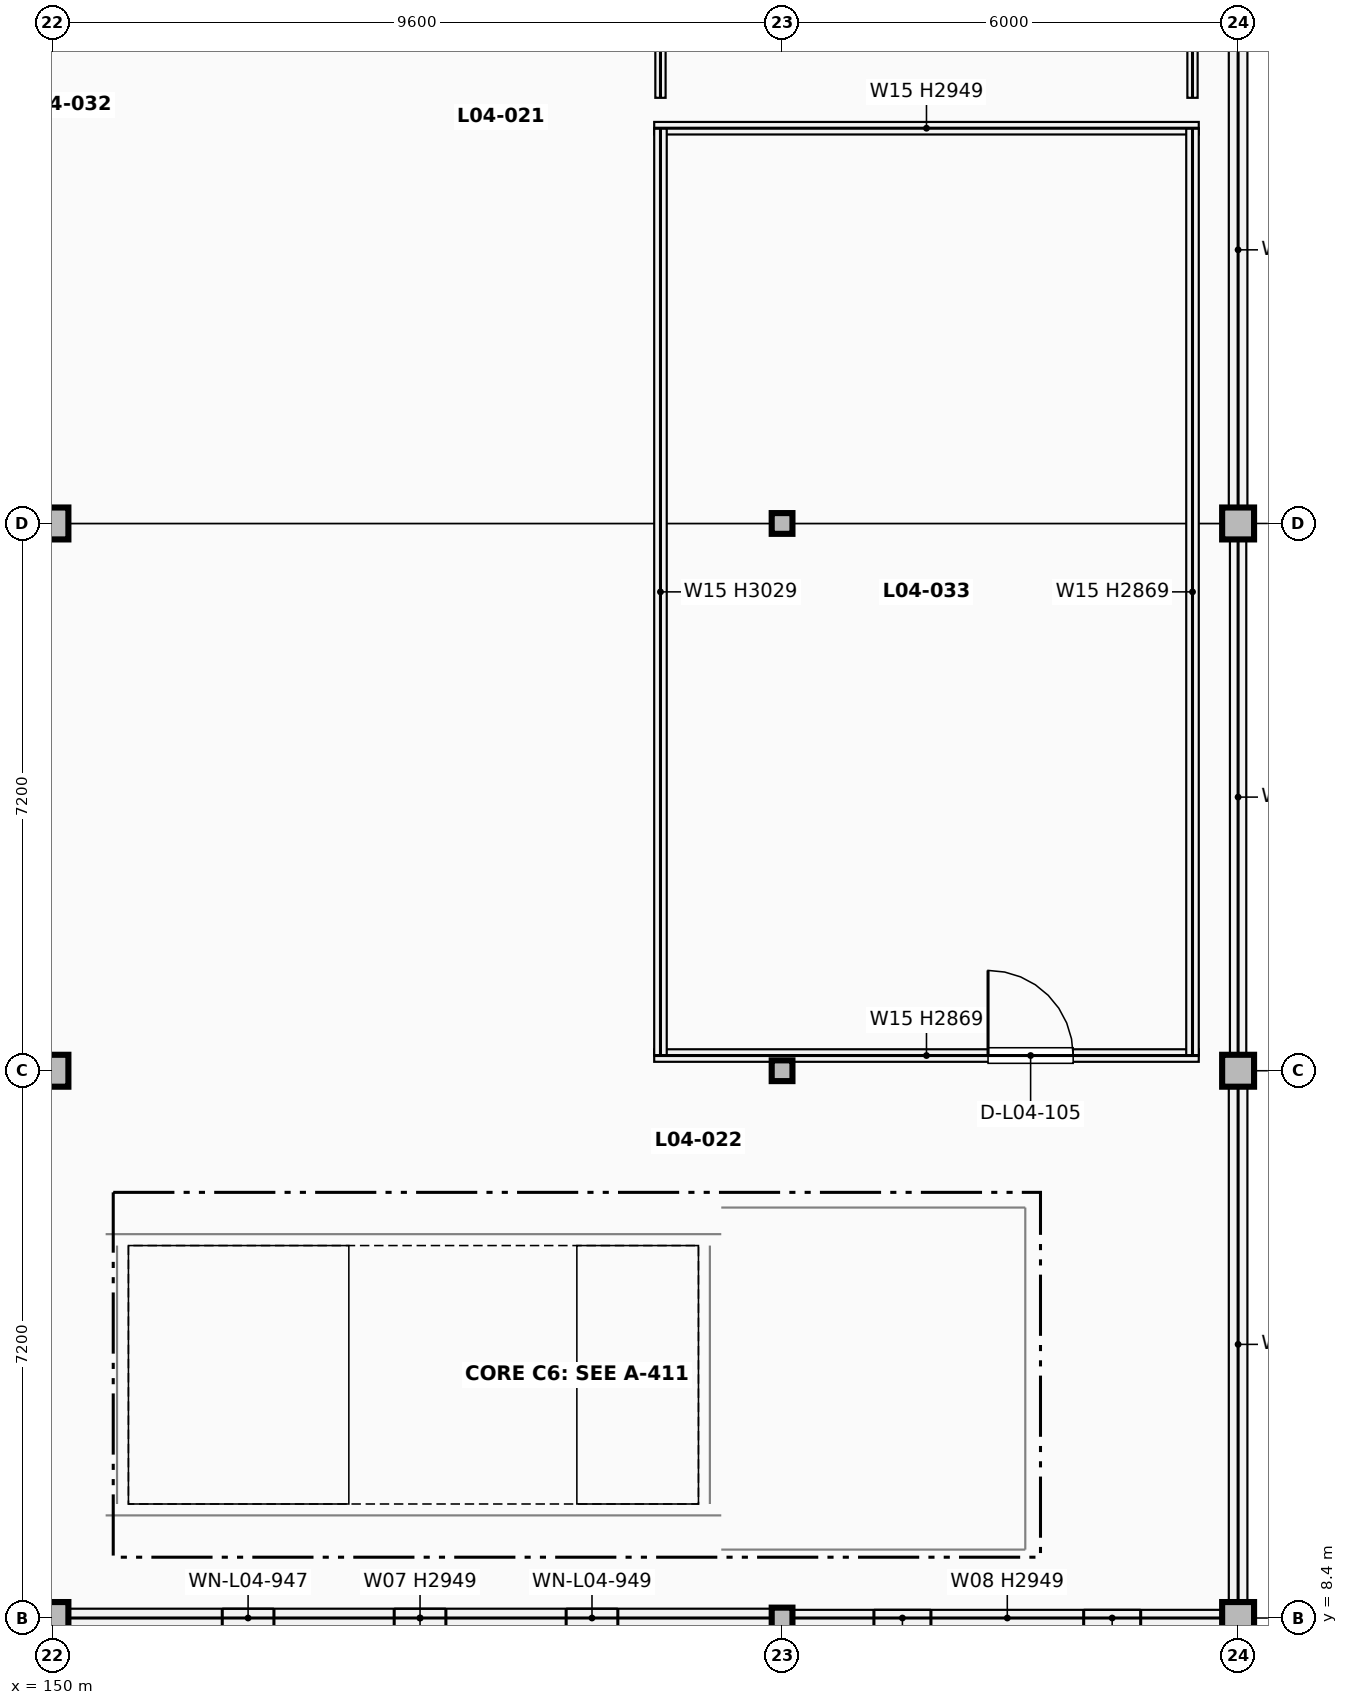
"""IFC4 building model, lengths in metres.
Left out: names, types, materials, properties, quantities, classifications, styles, units other than length and angle.
Written with IfcOpenShell. Run it as: python <this file> out.ifc"""

import sys

from ifc_helpers import new_model, si_unit, direction, frame, frame_2d, origin, origin_2d, place, context, subcontext, project, spatial, rectangle, hollow_circle, extrude, element, fill, save


model = new_model("IFC4")
c1 = context("Model", 3, precision=1e-05, world=origin(), true_north=direction((0.0, 1.0)))
c2 = subcontext(c1, "Body", "Model", "MODEL_VIEW")
j1 = project(units=[si_unit("LENGTHUNIT", "METRE"), si_unit("PLANEANGLEUNIT", "RADIAN")], contexts=[c1])
p1 = place(None, origin())
s1 = spatial("IfcSite", under=j1, at=p1, CompositionType="ELEMENT")
p2 = place(p1, origin())
s2 = spatial("IfcBuilding", under=s1, at=p2, CompositionType="ELEMENT")
p3 = place(p2, frame((0.0, 0.0, 17.34)))
s3 = spatial("IfcBuildingStorey", under=s2, at=p3, CompositionType="ELEMENT", Elevation=17.34)
for number, where, z_axis, x_axis in (
    (1, (150.0, 8.4, 0.0), (0.0, 0.0, 1.0), (1.0, 0.0, 0.0)),
    (2, (150.0, 15.6, 0.0), (0.0, 0.0, 1.0), (1.0, 0.0, 0.0)),
    (3, (150.0, 22.8, 0.0), (0.0, 0.0, 1.0), (1.0, 0.0, 0.0)),
):
    element("IfcColumn", number, at=place(p3, frame(where, z_axis=z_axis, x_axis=x_axis)), inside=s3, PredefinedType="COLUMN", context=c2, shape_type="SweptSolid", body=[
        extrude(rectangle(XDim=0.42, YDim=0.42, at=origin_2d()), origin(), (0.0, 0.0, 1.0), 3.74),
    ])
for number, where, z_axis, x_axis in (
    (4, (159.6, 8.4, 0.0), (0.0, 0.0, 1.0), (1.0, 0.0, 0.0)),
    (5, (159.6, 15.6, 0.0), (0.0, 0.0, 1.0), (1.0, 0.0, 0.0)),
    (6, (159.6, 22.8, 0.0), (0.0, 0.0, 1.0), (1.0, 0.0, 0.0)),
):
    element("IfcColumn", number, at=place(p3, frame(where, z_axis=z_axis, x_axis=x_axis)), inside=s3, PredefinedType="COLUMN", context=c2, shape_type="SweptSolid", body=[
        extrude(hollow_circle(Radius=0.136, WallThickness=0.012, at=origin_2d()), origin(), (0.0, 0.0, 1.0), 3.7),
    ])
for number, where, z_axis, x_axis in (
    (7, (165.6, 8.4, 0.0), (0.0, 0.0, 1.0), (1.0, 0.0, 0.0)),
    (8, (165.6, 15.6, 0.0), (0.0, 0.0, 1.0), (1.0, 0.0, 0.0)),
    (9, (165.6, 22.8, 0.0), (0.0, 0.0, 1.0), (1.0, 0.0, 0.0)),
):
    element("IfcColumn", number, at=place(p3, frame(where, z_axis=z_axis, x_axis=x_axis)), inside=s3, PredefinedType="COLUMN", context=c2, shape_type="SweptSolid", body=[
        extrude(rectangle(XDim=0.42, YDim=0.42, at=origin_2d()), origin(), (0.0, 0.0, 1.0), 3.74),
    ])
p4 = place(p3, frame((165.6, 8.612, 0.0), z_axis=(0.0, 0.0, 1.0), x_axis=(0.0, 1.0, 0.0)))
e10 = element("IfcWall", 10, at=p4, inside=s3, PredefinedType="SOLIDWALL", context=c2, shape_type="SweptSolid", body=[
    extrude(rectangle(XDim=6.776, YDim=0.245, at=frame_2d((3.388, 0.0))), origin(), (0.0, 0.0, 1.0), 2.869),
])
p5 = place(p3, frame((165.6, 15.812, 0.0), z_axis=(0.0, 0.0, 1.0), x_axis=(0.0, 1.0, 0.0)))
e11 = element("IfcWall", 11, at=p5, inside=s3, PredefinedType="SOLIDWALL", context=c2, shape_type="SweptSolid", body=[
    extrude(rectangle(XDim=6.776, YDim=0.215, at=frame_2d((3.388, 0.0))), origin(), (0.0, 0.0, 1.0), 2.869),
])
p6 = place(p3, frame((165.6, 23.012, 0.0), z_axis=(0.0, 0.0, 1.0), x_axis=(0.0, 1.0, 0.0)))
e12 = element("IfcWall", 12, at=p6, inside=s3, PredefinedType="SOLIDWALL", context=c2, shape_type="SweptSolid", body=[
    extrude(rectangle(XDim=6.776, YDim=0.245, at=frame_2d((3.388, 0.0))), origin(), (0.0, 0.0, 1.0), 2.869),
])
p7 = place(p3, frame((150.212, 8.4, 0.0), z_axis=(0.0, 0.0, 1.0), x_axis=(1.0, 0.0, 0.0)))
e13 = element("IfcWall", 13, at=p7, inside=s3, PredefinedType="SOLIDWALL", context=c2, shape_type="SweptSolid", body=[
    extrude(rectangle(XDim=9.25, YDim=0.245, at=frame_2d((4.625, 0.0))), origin(), (0.0, 0.0, 1.0), 2.949),
])
p8 = place(p7, frame((2.022, 0.0, 0.75)))
e14 = element("IfcOpeningElement", 14, at=p8, cuts=e13, PredefinedType="OPENING", context=c2, shape_type="SweptSolid", body=[
    extrude(rectangle(XDim=0.68, YDim=1.96, at=frame_2d((0.34, 0.98))), frame((0.0, 0.133, 0.0), z_axis=(0.0, -1.0, 0.0), x_axis=(1.0, 0.0, 0.0)), (0.0, 0.0, 1.0), 0.265),
])
p9 = place(p7, frame((4.285, 0.0, 0.75)))
e15 = element("IfcOpeningElement", 15, at=p9, cuts=e13, PredefinedType="OPENING", context=c2, shape_type="SweptSolid", body=[
    extrude(rectangle(XDim=0.68, YDim=1.96, at=frame_2d((0.34, 0.98))), frame((0.0, 0.133, 0.0), z_axis=(0.0, -1.0, 0.0), x_axis=(1.0, 0.0, 0.0)), (0.0, 0.0, 1.0), 0.265),
])
p10 = place(p7, frame((6.547, 0.0, 0.75)))
e16 = element("IfcOpeningElement", 16, at=p10, cuts=e13, PredefinedType="OPENING", context=c2, shape_type="SweptSolid", body=[
    extrude(rectangle(XDim=0.68, YDim=1.96, at=frame_2d((0.34, 0.98))), frame((0.0, 0.133, 0.0), z_axis=(0.0, -1.0, 0.0), x_axis=(1.0, 0.0, 0.0)), (0.0, 0.0, 1.0), 0.265),
])
p11 = place(p3, frame((159.739, 8.4, 0.0), z_axis=(0.0, 0.0, 1.0), x_axis=(1.0, 0.0, 0.0)))
e17 = element("IfcWall", 17, at=p11, inside=s3, PredefinedType="SOLIDWALL", context=c2, shape_type="SweptSolid", body=[
    extrude(rectangle(XDim=5.649, YDim=0.215, at=frame_2d((2.825, 0.0))), origin(), (0.0, 0.0, 1.0), 2.949),
])
p12 = place(p11, frame((1.07, 0.0, 0.75)))
e18 = element("IfcOpeningElement", 18, at=p12, cuts=e17, PredefinedType="OPENING", context=c2, shape_type="SweptSolid", body=[
    extrude(rectangle(XDim=0.75, YDim=1.9, at=frame_2d((0.375, 0.95))), frame((0.0, 0.118, 0.0), z_axis=(0.0, -1.0, 0.0), x_axis=(1.0, 0.0, 0.0)), (0.0, 0.0, 1.0), 0.235),
])
p13 = place(p11, frame((3.83, 0.0, 0.75)))
e19 = element("IfcOpeningElement", 19, at=p13, cuts=e17, PredefinedType="OPENING", context=c2, shape_type="SweptSolid", body=[
    extrude(rectangle(XDim=0.75, YDim=1.9, at=frame_2d((0.375, 0.95))), frame((0.0, 0.118, 0.0), z_axis=(0.0, -1.0, 0.0), x_axis=(1.0, 0.0, 0.0)), (0.0, 0.0, 1.0), 0.235),
])
p14 = place(p3, frame((150.85, 9.9, 0.0), z_axis=(0.0, 0.0, 1.0), x_axis=(0.0, 1.0, 0.0)))
e20 = element("IfcWall", 20, at=p14, inside=s3, PredefinedType="SHEAR", context=c2, shape_type="SweptSolid", body=[
    extrude(rectangle(XDim=3.4, YDim=0.3, at=frame_2d((1.7, 0.0))), origin(), (0.0, 0.0, 1.0), 3.74),
])
for number, where, z_axis, x_axis in (
    (21, (150.7, 9.75, 0.0), (0.0, 0.0, 1.0), (1.0, 0.0, 0.0)),
    (22, (150.7, 13.45, 0.0), (0.0, 0.0, 1.0), (1.0, 0.0, 0.0)),
):
    element("IfcWall", number, at=place(p3, frame(where, z_axis=z_axis, x_axis=x_axis)), inside=s3, PredefinedType="SHEAR", context=c2, shape_type="SweptSolid", body=[
        extrude(rectangle(XDim=8.1, YDim=0.3, at=frame_2d((4.05, 0.0))), origin(), (0.0, 0.0, 1.0), 3.74),
    ])
p15 = place(p3, frame((158.65, 9.9, 0.0), z_axis=(0.0, 0.0, 1.0), x_axis=(0.0, 1.0, 0.0)))
e23 = element("IfcWall", 23, at=p15, inside=s3, PredefinedType="SHEAR", context=c2, shape_type="SweptSolid", body=[
    extrude(rectangle(XDim=3.4, YDim=0.3, at=frame_2d((1.7, 0.0))), origin(), (0.0, 0.0, 1.0), 3.74),
])
p16 = place(p15, frame((1.1, 0.0, 0.0)))
e24 = element("IfcOpeningElement", 24, at=p16, cuts=e23, PredefinedType="OPENING", context=c2, shape_type="SweptSolid", body=[
    extrude(rectangle(XDim=1.2, YDim=2.2, at=frame_2d((0.6, 1.1))), frame((0.0, 0.16, 0.0), z_axis=(0.0, -1.0, 0.0), x_axis=(1.0, 0.0, 0.0)), (0.0, 0.0, 1.0), 0.32),
])
p17 = place(p3, frame((162.8, 9.3, 0.0), z_axis=(0.0, 0.0, 1.0), x_axis=(0.0, 1.0, 0.0)))
e25 = element("IfcWall", 25, at=p17, inside=s3, PredefinedType="PARTITIONING", context=c2, shape_type="SweptSolid", body=[
    extrude(rectangle(XDim=4.5, YDim=0.2, at=frame_2d((2.25, 0.0))), origin(), (0.0, 0.0, 1.0), 2.949),
])
p18 = place(p3, frame((158.8, 9.3, 0.0), z_axis=(0.0, 0.0, 1.0), x_axis=(1.0, 0.0, 0.0)))
e26 = element("IfcWall", 26, at=p18, inside=s3, PredefinedType="PARTITIONING", context=c2, shape_type="SweptSolid", body=[
    extrude(rectangle(XDim=4.0, YDim=0.2, at=frame_2d((2.0, 0.0))), origin(), (0.0, 0.0, 1.0), 2.949),
])
p19 = place(p3, frame((158.8, 13.8, 0.0), z_axis=(0.0, 0.0, 1.0), x_axis=(1.0, 0.0, 0.0)))
e27 = element("IfcWall", 27, at=p19, inside=s3, PredefinedType="PARTITIONING", context=c2, shape_type="SweptSolid", body=[
    extrude(rectangle(XDim=4.0, YDim=0.2, at=frame_2d((2.0, 0.0))), origin(), (0.0, 0.0, 1.0), 2.949),
])
p20 = place(p19, frame((1.275, 0.0, 0.0)))
e28 = element("IfcOpeningElement", 28, at=p20, cuts=e27, PredefinedType="OPENING", context=c2, shape_type="SweptSolid", body=[
    extrude(rectangle(XDim=1.45, YDim=2.2, at=frame_2d((0.725, 1.1))), frame((0.0, 0.11, 0.0), z_axis=(0.0, -1.0, 0.0), x_axis=(1.0, 0.0, 0.0)), (0.0, 0.0, 1.0), 0.22),
])
p21 = place(p3, frame((157.917, 15.8, 0.0), z_axis=(0.0, 0.0, 1.0), x_axis=(1.0, 0.0, 0.0)))
e29 = element("IfcWall", 29, at=p21, inside=s3, PredefinedType="PARTITIONING", context=c2, shape_type="SweptSolid", body=[
    extrude(rectangle(XDim=7.165, YDim=0.165, at=frame_2d((3.583, 0.0))), origin(), (0.0, 0.0, 1.0), 2.869),
])
p22 = place(p21, frame((4.393, 0.0, 0.0)))
e30 = element("IfcOpeningElement", 30, at=p22, cuts=e29, PredefinedType="OPENING", context=c2, shape_type="SweptSolid", body=[
    extrude(rectangle(XDim=1.12, YDim=2.22, at=frame_2d((0.56, 1.11))), frame((0.0, 0.093, 0.0), z_axis=(0.0, -1.0, 0.0), x_axis=(1.0, 0.0, 0.0)), (0.0, 0.0, 1.0), 0.185),
])
p23 = place(p3, frame((157.917, 28.0, 0.0), z_axis=(0.0, 0.0, 1.0), x_axis=(1.0, 0.0, 0.0)))
e31 = element("IfcWall", 31, at=p23, inside=s3, PredefinedType="PARTITIONING", context=c2, shape_type="SweptSolid", body=[
    extrude(rectangle(XDim=7.165, YDim=0.165, at=frame_2d((3.583, 0.0))), origin(), (0.0, 0.0, 1.0), 2.949),
])
p24 = place(p3, frame((158.0, 15.8, 0.0), z_axis=(0.0, 0.0, 1.0), x_axis=(0.0, 1.0, 0.0)))
e32 = element("IfcWall", 32, at=p24, inside=s3, PredefinedType="PARTITIONING", context=c2, shape_type="SweptSolid", body=[
    extrude(rectangle(XDim=12.2, YDim=0.165, at=frame_2d((6.1, 0.0))), origin(), (0.0, 0.0, 1.0), 3.029),
])
p25 = place(p3, frame((165.0, 15.8, 0.0), z_axis=(0.0, 0.0, 1.0), x_axis=(0.0, 1.0, 0.0)))
e33 = element("IfcWall", 33, at=p25, inside=s3, PredefinedType="PARTITIONING", context=c2, shape_type="SweptSolid", body=[
    extrude(rectangle(XDim=12.2, YDim=0.165, at=frame_2d((6.1, 0.0))), origin(), (0.0, 0.0, 1.0), 2.869),
])
p26 = place(p3, frame((158.0, 28.4, 0.0), z_axis=(0.0, 0.0, 1.0), x_axis=(0.0, 1.0, 0.0)))
e34 = element("IfcWall", 34, at=p26, inside=s3, PredefinedType="PARTITIONING", context=c2, shape_type="SweptSolid", body=[
    extrude(rectangle(XDim=15.6, YDim=0.135, at=frame_2d((7.8, 0.0))), origin(), (0.0, 0.0, 1.0), 3.029),
])
p27 = place(p26, frame((3.645, 0.0, 0.0)))
e35 = element("IfcOpeningElement", 35, at=p27, cuts=e34, PredefinedType="OPENING", context=c2, shape_type="SweptSolid", body=[
    extrude(rectangle(XDim=1.42, YDim=2.26, at=frame_2d((0.71, 1.13))), frame((0.0, 0.078, 0.0), z_axis=(0.0, -1.0, 0.0), x_axis=(1.0, 0.0, 0.0)), (0.0, 0.0, 1.0), 0.155),
])
p28 = place(p3, frame((165.0, 28.4, 0.0), z_axis=(0.0, 0.0, 1.0), x_axis=(0.0, 1.0, 0.0)))
e36 = element("IfcWall", 36, at=p28, inside=s3, PredefinedType="PARTITIONING", context=c2, shape_type="SweptSolid", body=[
    extrude(rectangle(XDim=15.6, YDim=0.135, at=frame_2d((7.8, 0.0))), origin(), (0.0, 0.0, 1.0), 2.869),
])
p29 = place(p8, origin())
e37 = element("IfcWindow", 37, at=p29, inside=s3, PartitioningType="SINGLE_PANEL", PredefinedType="WINDOW", context=c2, shape_type="SweptSolid", body=[
    extrude(rectangle(XDim=0.68, YDim=1.96, at=frame_2d((0.34, 0.98))), frame((0.0, 0.03, 0.0), z_axis=(0.0, -1.0, 0.0), x_axis=(1.0, 0.0, 0.0)), (0.0, 0.0, 1.0), 0.06),
])
fill(e14, e37)
p30 = place(p9, origin())
e38 = element("IfcWindow", 38, at=p30, inside=s3, PartitioningType="SINGLE_PANEL", PredefinedType="WINDOW", context=c2, shape_type="SweptSolid", body=[
    extrude(rectangle(XDim=0.68, YDim=1.96, at=frame_2d((0.34, 0.98))), frame((0.0, 0.03, 0.0), z_axis=(0.0, -1.0, 0.0), x_axis=(1.0, 0.0, 0.0)), (0.0, 0.0, 1.0), 0.06),
])
fill(e15, e38)
p31 = place(p10, origin())
e39 = element("IfcWindow", 39, at=p31, inside=s3, PartitioningType="SINGLE_PANEL", PredefinedType="WINDOW", context=c2, shape_type="SweptSolid", body=[
    extrude(rectangle(XDim=0.68, YDim=1.96, at=frame_2d((0.34, 0.98))), frame((0.0, 0.03, 0.0), z_axis=(0.0, -1.0, 0.0), x_axis=(1.0, 0.0, 0.0)), (0.0, 0.0, 1.0), 0.06),
])
fill(e16, e39)
p32 = place(p12, origin())
e40 = element("IfcWindow", 40, at=p32, inside=s3, PartitioningType="SINGLE_PANEL", PredefinedType="WINDOW", context=c2, shape_type="SweptSolid", body=[
    extrude(rectangle(XDim=0.75, YDim=1.9, at=frame_2d((0.375, 0.95))), frame((0.0, 0.03, 0.0), z_axis=(0.0, -1.0, 0.0), x_axis=(1.0, 0.0, 0.0)), (0.0, 0.0, 1.0), 0.06),
])
fill(e18, e40)
p33 = place(p13, origin())
e41 = element("IfcWindow", 41, at=p33, inside=s3, PartitioningType="SINGLE_PANEL", PredefinedType="WINDOW", context=c2, shape_type="SweptSolid", body=[
    extrude(rectangle(XDim=0.75, YDim=1.9, at=frame_2d((0.375, 0.95))), frame((0.0, 0.03, 0.0), z_axis=(0.0, -1.0, 0.0), x_axis=(1.0, 0.0, 0.0)), (0.0, 0.0, 1.0), 0.06),
])
fill(e19, e41)
p34 = place(p16, origin())
e42 = element("IfcDoor", 42, at=p34, inside=s3, OperationType="SINGLE_SWING_RIGHT", PredefinedType="DOOR", context=c2, shape_type="SweptSolid", body=[
    extrude(rectangle(XDim=1.2, YDim=2.2, at=frame_2d((0.6, 1.1))), frame((0.0, 0.025, 0.0), z_axis=(0.0, -1.0, 0.0), x_axis=(1.0, 0.0, 0.0)), (0.0, 0.0, 1.0), 0.05),
])
fill(e24, e42)
p35 = place(p20, origin())
e43 = element("IfcDoor", 43, at=p35, inside=s3, OperationType="DOUBLE_DOOR_SINGLE_SWING", PredefinedType="DOOR", context=c2, shape_type="SweptSolid", body=[
    extrude(rectangle(XDim=1.45, YDim=2.2, at=frame_2d((0.725, 1.1))), frame((0.0, 0.025, 0.0), z_axis=(0.0, -1.0, 0.0), x_axis=(1.0, 0.0, 0.0)), (0.0, 0.0, 1.0), 0.05),
])
fill(e28, e43)
p36 = place(p22, origin())
e44 = element("IfcDoor", 44, at=p36, inside=s3, OperationType="SINGLE_SWING_LEFT", PredefinedType="DOOR", context=c2, shape_type="SweptSolid", body=[
    extrude(rectangle(XDim=1.12, YDim=2.22, at=frame_2d((0.56, 1.11))), frame((0.0, 0.025, 0.0), z_axis=(0.0, -1.0, 0.0), x_axis=(1.0, 0.0, 0.0)), (0.0, 0.0, 1.0), 0.05),
])
fill(e30, e44)
save(model, sys.argv[1])
